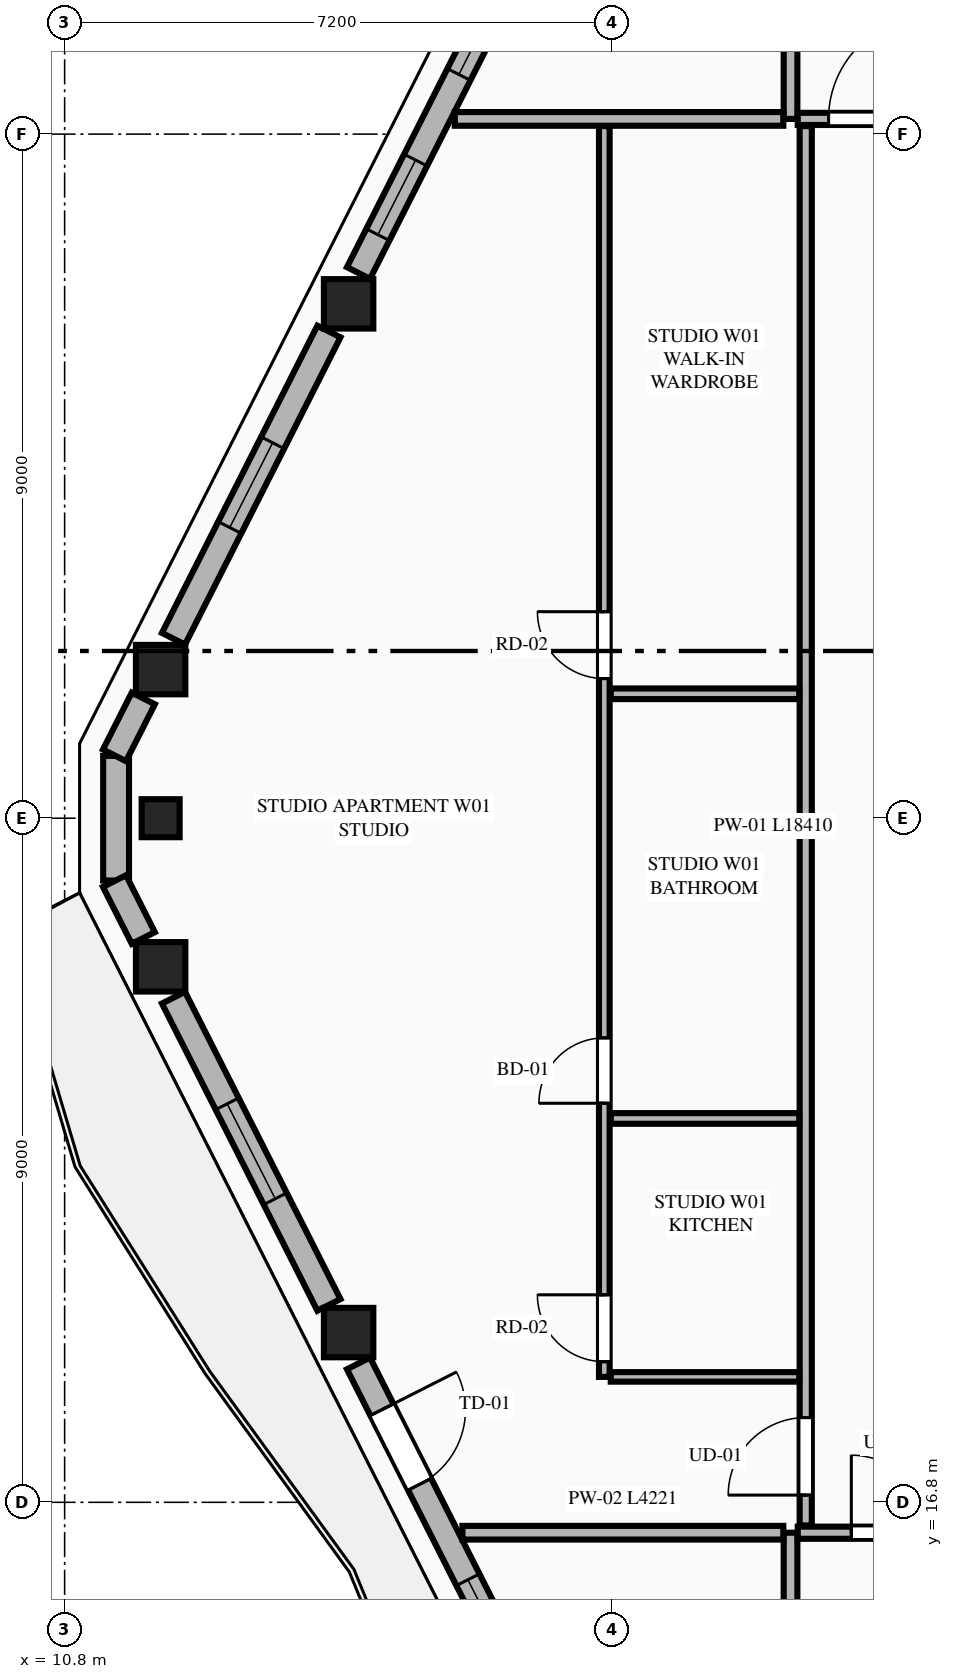
"""IFC4 building model, lengths in metres.
Left out: names, types, materials, properties, quantities, classifications, styles, units other than length and angle.
Written with IfcOpenShell. Run it as: python <this file> out.ifc"""

import sys

from ifc_helpers import new_model, si_unit, direction, frame, frame_2d, origin, origin_2d, place, context, subcontext, project, spatial, rectangle, extrude, element, fill, save


model = new_model("IFC4")
c1 = context("Model", 3, precision=1e-05, world=origin(), true_north=direction((0.0, 1.0)))
c2 = subcontext(c1, "Body", "Model", "MODEL_VIEW")
j1 = project(units=[si_unit("LENGTHUNIT", "METRE"), si_unit("PLANEANGLEUNIT", "RADIAN")], contexts=[c1])
p1 = place(None, origin())
s1 = spatial("IfcSite", under=j1, at=p1, CompositionType="ELEMENT")
p2 = place(p1, origin())
s2 = spatial("IfcBuilding", under=s1, at=p2, CompositionType="ELEMENT")
p3 = place(p2, frame((0.0, 0.0, 267.15)))
s3 = spatial("IfcBuildingStorey", under=s2, at=p3, CompositionType="ELEMENT", Elevation=267.15)
for number, where, z_axis, x_axis in (
    (1, (14.536, 32.567, 0.0), (0.0, 0.0, 1.0), (1.0, 0.0, 0.0)),
    (2, (12.063, 27.755, 0.0), (0.0, 0.0, 1.0), (1.0, 0.0, 0.0)),
    (3, (12.063, 23.845, 0.0), (0.0, 0.0, 1.0), (1.0, 0.0, 0.0)),
    (4, (14.536, 19.033, 0.0), (0.0, 0.0, 1.0), (1.0, 0.0, 0.0)),
):
    element("IfcColumn", number, at=place(p3, frame(where, z_axis=z_axis, x_axis=x_axis)), inside=s3, PredefinedType="COLUMN", context=c2, shape_type="SweptSolid", body=[
        extrude(rectangle(XDim=0.65, YDim=0.65, at=origin_2d()), origin(), (0.0, 0.0, 1.0), 3.65),
    ])
p4 = place(p3, frame((12.063, 25.8, 0.0), z_axis=(0.0, 0.0, 1.0), x_axis=(0.0, -1.0, 0.0)))
e5 = element("IfcColumn", 5, at=p4, inside=s3, PredefinedType="PILASTER", context=c2, shape_type="SweptSolid", body=[
    extrude(rectangle(XDim=0.5, YDim=0.35, at=origin_2d()), origin(), (0.0, 0.0, 1.0), 3.65),
])
p5 = place(p3, frame((11.477, 26.62, 0.0), z_axis=(0.0, 0.0, 1.0), x_axis=(0.0, -1.0, 0.0)))
e6 = element("IfcWall", 6, at=p5, inside=s3, PredefinedType="STANDARD", context=c2, shape_type="SweptSolid", body=[
    extrude(rectangle(XDim=1.64, YDim=0.34, at=frame_2d((0.82, 0.0))), origin(), (0.0, 0.0, 1.0), 3.45),
])
p6 = place(p3, frame((16.798, 37.187, 0.0), z_axis=(0.0, 0.0, 1.0), x_axis=(-0.451447516904, -0.892297674255, 0.0)))
e7 = element("IfcWall", 7, at=p6, inside=s3, PredefinedType="STANDARD", context=c2, shape_type="SweptSolid", body=[
    extrude(rectangle(XDim=4.723, YDim=0.34, at=frame_2d((2.361, 0.0))), origin(), (0.0, 0.0, 1.0), 2.983),
])
p7 = place(p6, frame((0.396, 0.0, 0.75)))
e8 = element("IfcOpeningElement", 8, at=p7, cuts=e7, PredefinedType="OPENING", context=c2, shape_type="SweptSolid", body=[
    extrude(rectangle(XDim=1.4, YDim=2.05, at=frame_2d((0.7, 1.025))), frame((0.0, 0.18, 0.0), z_axis=(0.0, -1.0, 0.0), x_axis=(1.0, 0.0, 0.0)), (0.0, 0.0, 1.0), 0.36),
])
p8 = place(p6, frame((3.058, 0.0, 0.75)))
e9 = element("IfcOpeningElement", 9, at=p8, cuts=e7, PredefinedType="OPENING", context=c2, shape_type="SweptSolid", body=[
    extrude(rectangle(XDim=1.1, YDim=2.0, at=frame_2d((0.55, 1.0))), frame((0.0, 0.18, 0.0), z_axis=(0.0, -1.0, 0.0), x_axis=(1.0, 0.0, 0.0)), (0.0, 0.0, 1.0), 0.36),
])
p9 = place(p3, frame((14.277, 32.203, 0.0), z_axis=(0.0, 0.0, 1.0), x_axis=(-0.45147697324, -0.892282770558, 0.0)))
e10 = element("IfcWall", 10, at=p9, inside=s3, PredefinedType="STANDARD", context=c2, shape_type="SweptSolid", body=[
    extrude(rectangle(XDim=4.53, YDim=0.34, at=frame_2d((2.265, 0.0))), origin(), (0.0, 0.0, 1.0), 2.983),
])
p10 = place(p9, frame((1.64, 0.0, 0.75)))
e11 = element("IfcOpeningElement", 11, at=p10, cuts=e10, PredefinedType="OPENING", context=c2, shape_type="SweptSolid", body=[
    extrude(rectangle(XDim=1.25, YDim=1.95, at=frame_2d((0.625, 0.975))), frame((0.0, 0.18, 0.0), z_axis=(0.0, -1.0, 0.0), x_axis=(1.0, 0.0, 0.0)), (0.0, 0.0, 1.0), 0.36),
])
p11 = place(p3, frame((11.835, 27.376, 0.0), z_axis=(0.0, 0.0, 1.0), x_axis=(-0.45139691133, -0.892323275748, 0.0)))
e12 = element("IfcWall", 12, at=p11, inside=s3, PredefinedType="STANDARD", context=c2, shape_type="SweptSolid", body=[
    extrude(rectangle(XDim=0.839, YDim=0.34, at=frame_2d((0.42, 0.0))), origin(), (0.0, 0.0, 1.0), 3.45),
])
p12 = place(p3, frame((11.456, 24.973, 0.0), z_axis=(0.0, 0.0, 1.0), x_axis=(0.4515140893, -0.892263989615, 0.0)))
e13 = element("IfcWall", 13, at=p12, inside=s3, PredefinedType="STANDARD", context=c2, shape_type="SweptSolid", body=[
    extrude(rectangle(XDim=0.839, YDim=0.34, at=frame_2d((0.419, 0.0))), origin(), (0.0, 0.0, 1.0), 3.45),
])
p13 = place(p3, frame((12.232, 23.439, 0.0), z_axis=(0.0, 0.0, 1.0), x_axis=(0.45147697324, -0.892282770558, 0.0)))
e14 = element("IfcWall", 14, at=p13, inside=s3, PredefinedType="STANDARD", context=c2, shape_type="SweptSolid", body=[
    extrude(rectangle(XDim=4.53, YDim=0.34, at=frame_2d((2.265, 0.0))), origin(), (0.0, 0.0, 1.0), 2.983),
])
p14 = place(p13, frame((1.565, 0.0, 0.75)))
e15 = element("IfcOpeningElement", 15, at=p14, cuts=e14, PredefinedType="OPENING", context=c2, shape_type="SweptSolid", body=[
    extrude(rectangle(XDim=1.4, YDim=2.05, at=frame_2d((0.7, 1.025))), frame((0.0, 0.18, 0.0), z_axis=(0.0, -1.0, 0.0), x_axis=(1.0, 0.0, 0.0)), (0.0, 0.0, 1.0), 0.36),
])
p15 = place(p3, frame((14.666, 18.627, 0.0), z_axis=(0.0, 0.0, 1.0), x_axis=(0.451468341582, -0.892287137949, 0.0)))
e16 = element("IfcWall", 16, at=p15, inside=s3, PredefinedType="STANDARD", context=c2, shape_type="SweptSolid", body=[
    extrude(rectangle(XDim=4.723, YDim=0.34, at=frame_2d((2.361, 0.0))), origin(), (0.0, 0.0, 1.0), 2.983),
])
p16 = place(p15, frame((0.682, 0.0, 0.0)))
e17 = element("IfcOpeningElement", 17, at=p16, cuts=e16, PredefinedType="OPENING", context=c2, shape_type="SweptSolid", body=[
    extrude(rectangle(XDim=1.1, YDim=2.25, at=frame_2d((0.55, 1.125))), frame((0.0, 0.18, 0.0), z_axis=(0.0, -1.0, 0.0), x_axis=(1.0, 0.0, 0.0)), (0.0, 0.0, 1.0), 0.36),
])
p17 = place(p15, frame((3.189, 0.0, 0.75)))
e18 = element("IfcOpeningElement", 18, at=p17, cuts=e16, PredefinedType="OPENING", context=c2, shape_type="SweptSolid", body=[
    extrude(rectangle(XDim=1.1, YDim=2.0, at=frame_2d((0.55, 1.0))), frame((0.0, 0.18, 0.0), z_axis=(0.0, -1.0, 0.0), x_axis=(1.0, 0.0, 0.0)), (0.0, 0.0, 1.0), 0.36),
])
p18 = place(p3, frame((20.35, 8.119, 0.0), z_axis=(0.0, 0.0, 1.0), x_axis=(0.0, 1.0, 0.0)))
e19 = element("IfcWall", 19, at=p18, inside=s3, PredefinedType="PARTITIONING", context=c2, shape_type="SweptSolid", body=[
    extrude(rectangle(XDim=8.281, YDim=0.18, at=frame_2d((4.141, 0.0))), origin(), (0.0, 0.0, 1.0), 3.45),
])
p19 = place(p3, frame((20.445, 16.4, 0.0), z_axis=(0.0, 0.0, 1.0), x_axis=(1.0, 0.0, 0.0)))
e20 = element("IfcWall", 20, at=p19, inside=s3, PredefinedType="PARTITIONING", context=c2, shape_type="SweptSolid", body=[
    extrude(rectangle(XDim=23.91, YDim=0.16, at=frame_2d((11.955, 0.0))), origin(), (0.0, 0.0, 1.0), 3.45),
])
p20 = place(p19, frame((0.705, 0.0, 0.0)))
e21 = element("IfcOpeningElement", 21, at=p20, cuts=e20, PredefinedType="OPENING", context=c2, shape_type="SweptSolid", body=[
    extrude(rectangle(XDim=1.02, YDim=2.25, at=frame_2d((0.51, 1.125))), frame((0.0, 0.09, 0.0), z_axis=(0.0, -1.0, 0.0), x_axis=(1.0, 0.0, 0.0)), (0.0, 0.0, 1.0), 0.18),
])
p21 = place(p3, frame((20.35, 35.0, 0.0), z_axis=(0.0, 0.0, 1.0), x_axis=(0.0, 1.0, 0.0)))
e22 = element("IfcWall", 22, at=p21, inside=s3, PredefinedType="PARTITIONING", context=c2, shape_type="SweptSolid", body=[
    extrude(rectangle(XDim=8.481, YDim=0.18, at=frame_2d((4.24, 0.0))), origin(), (0.0, 0.0, 1.0), 3.45),
])
p22 = place(p3, frame((20.445, 35.0, 0.0), z_axis=(0.0, 0.0, 1.0), x_axis=(1.0, 0.0, 0.0)))
e23 = element("IfcWall", 23, at=p22, inside=s3, PredefinedType="PARTITIONING", context=c2, shape_type="SweptSolid", body=[
    extrude(rectangle(XDim=23.91, YDim=0.16, at=frame_2d((11.955, 0.0))), origin(), (0.0, 0.0, 1.0), 3.45),
])
p23 = place(p22, frame((0.405, 0.0, 0.0)))
e24 = element("IfcOpeningElement", 24, at=p23, cuts=e23, PredefinedType="OPENING", context=c2, shape_type="SweptSolid", body=[
    extrude(rectangle(XDim=1.35, YDim=2.35, at=frame_2d((0.675, 1.175))), frame((0.0, 0.09, 0.0), z_axis=(0.0, -1.0, 0.0), x_axis=(1.0, 0.0, 0.0)), (0.0, 0.0, 1.0), 0.18),
])
p24 = place(p3, frame((16.034, 16.4, 0.0), z_axis=(0.0, 0.0, 1.0), x_axis=(1.0, 0.0, 0.0)))
e25 = element("IfcWall", 25, at=p24, inside=s3, PredefinedType="PARTITIONING", context=c2, shape_type="SweptSolid", body=[
    extrude(rectangle(XDim=4.221, YDim=0.18, at=frame_2d((2.11, 0.0))), origin(), (0.0, 0.0, 1.0), 3.45),
])
p25 = place(p3, frame((15.933, 35.0, 0.0), z_axis=(0.0, 0.0, 1.0), x_axis=(1.0, 0.0, 0.0)))
e26 = element("IfcWall", 26, at=p25, inside=s3, PredefinedType="PARTITIONING", context=c2, shape_type="SweptSolid", body=[
    extrude(rectangle(XDim=4.322, YDim=0.18, at=frame_2d((2.161, 0.0))), origin(), (0.0, 0.0, 1.0), 3.45),
])
p26 = place(p3, frame((20.55, 16.495, 0.0), z_axis=(0.0, 0.0, 1.0), x_axis=(0.0, 1.0, 0.0)))
e27 = element("IfcWall", 27, at=p26, inside=s3, PredefinedType="PARTITIONING", context=c2, shape_type="SweptSolid", body=[
    extrude(rectangle(XDim=18.41, YDim=0.16, at=frame_2d((9.205, 0.0))), origin(), (0.0, 0.0, 1.0), 3.137),
])
p27 = place(p26, frame((0.4, 0.0, 0.0)))
e28 = element("IfcOpeningElement", 28, at=p27, cuts=e27, PredefinedType="OPENING", context=c2, shape_type="SweptSolid", body=[
    extrude(rectangle(XDim=1.02, YDim=2.25, at=frame_2d((0.51, 1.125))), frame((0.0, 0.09, 0.0), z_axis=(0.0, -1.0, 0.0), x_axis=(1.0, 0.0, 0.0)), (0.0, 0.0, 1.0), 0.18),
])
p28 = place(p3, frame((17.985, 18.45, 0.0), z_axis=(0.0, 0.0, 1.0), x_axis=(1.0, 0.0, 0.0)))
e29 = element("IfcWall", 29, at=p28, inside=s3, PredefinedType="PARTITIONING", context=c2, shape_type="SweptSolid", body=[
    extrude(rectangle(XDim=2.48, YDim=0.125, at=frame_2d((1.24, 0.0))), origin(), (0.0, 0.0, 1.0), 3.45),
])
p29 = place(p3, frame((17.9, 18.45, 0.0), z_axis=(0.0, 0.0, 1.0), x_axis=(0.0, 1.0, 0.0)))
e30 = element("IfcWall", 30, at=p29, inside=s3, PredefinedType="PLUMBINGWALL", context=c2, shape_type="SweptSolid", body=[
    extrude(rectangle(XDim=16.455, YDim=0.14, at=frame_2d((8.228, 0.0))), origin(), (0.0, 0.0, 1.0), 3.45),
])
p30 = place(p29, frame((3.6, 0.0, 0.0)))
e31 = element("IfcOpeningElement", 31, at=p30, cuts=e30, PredefinedType="OPENING", context=c2, shape_type="SweptSolid", body=[
    extrude(rectangle(XDim=0.86, YDim=2.1, at=frame_2d((0.43, 1.05))), frame((0.0, 0.08, 0.0), z_axis=(0.0, -1.0, 0.0), x_axis=(1.0, 0.0, 0.0)), (0.0, 0.0, 1.0), 0.16),
])
p31 = place(p29, frame((9.187, 0.0, 0.0)))
e32 = element("IfcOpeningElement", 32, at=p31, cuts=e30, PredefinedType="OPENING", context=c2, shape_type="SweptSolid", body=[
    extrude(rectangle(XDim=0.88, YDim=2.15, at=frame_2d((0.44, 1.075))), frame((0.0, 0.08, 0.0), z_axis=(0.0, -1.0, 0.0), x_axis=(1.0, 0.0, 0.0)), (0.0, 0.0, 1.0), 0.16),
])
p32 = place(p29, frame((0.2, 0.0, 0.0)))
e33 = element("IfcOpeningElement", 33, at=p32, cuts=e30, PredefinedType="OPENING", context=c2, shape_type="SweptSolid", body=[
    extrude(rectangle(XDim=0.88, YDim=2.15, at=frame_2d((0.44, 1.075))), frame((0.0, 0.08, 0.0), z_axis=(0.0, -1.0, 0.0), x_axis=(1.0, 0.0, 0.0)), (0.0, 0.0, 1.0), 0.16),
])
for number, where, z_axis, x_axis in (
    (34, (17.985, 21.85, 0.0), (0.0, 0.0, 1.0), (1.0, 0.0, 0.0)),
    (35, (17.985, 27.437, 0.0), (0.0, 0.0, 1.0), (1.0, 0.0, 0.0)),
):
    element("IfcWall", number, at=place(p3, frame(where, z_axis=z_axis, x_axis=x_axis)), inside=s3, PredefinedType="PLUMBINGWALL", context=c2, shape_type="SweptSolid", body=[
        extrude(rectangle(XDim=2.48, YDim=0.14, at=frame_2d((1.24, 0.0))), origin(), (0.0, 0.0, 1.0), 3.45),
    ])
p33 = place(p7, origin())
e36 = element("IfcWindow", 36, at=p33, inside=s3, PartitioningType="SINGLE_PANEL", PredefinedType="WINDOW", context=c2, shape_type="SweptSolid", body=[
    extrude(rectangle(XDim=1.4, YDim=2.05, at=frame_2d((0.7, 1.025))), frame((0.0, 0.03, 0.0), z_axis=(0.0, -1.0, 0.0), x_axis=(1.0, 0.0, 0.0)), (0.0, 0.0, 1.0), 0.06),
])
fill(e8, e36)
p34 = place(p10, origin())
e37 = element("IfcWindow", 37, at=p34, inside=s3, PartitioningType="SINGLE_PANEL", PredefinedType="WINDOW", context=c2, shape_type="SweptSolid", body=[
    extrude(rectangle(XDim=1.25, YDim=1.95, at=frame_2d((0.625, 0.975))), frame((0.0, 0.03, 0.0), z_axis=(0.0, -1.0, 0.0), x_axis=(1.0, 0.0, 0.0)), (0.0, 0.0, 1.0), 0.06),
])
fill(e11, e37)
p35 = place(p14, origin())
e38 = element("IfcWindow", 38, at=p35, inside=s3, PartitioningType="SINGLE_PANEL", PredefinedType="WINDOW", context=c2, shape_type="SweptSolid", body=[
    extrude(rectangle(XDim=1.4, YDim=2.05, at=frame_2d((0.7, 1.025))), frame((0.0, 0.03, 0.0), z_axis=(0.0, -1.0, 0.0), x_axis=(1.0, 0.0, 0.0)), (0.0, 0.0, 1.0), 0.06),
])
fill(e15, e38)
p36 = place(p16, origin())
e39 = element("IfcDoor", 39, at=p36, inside=s3, OperationType="SINGLE_SWING_LEFT", PredefinedType="DOOR", context=c2, shape_type="SweptSolid", body=[
    extrude(rectangle(XDim=1.1, YDim=2.25, at=frame_2d((0.55, 1.125))), frame((0.0, 0.025, 0.0), z_axis=(0.0, -1.0, 0.0), x_axis=(1.0, 0.0, 0.0)), (0.0, 0.0, 1.0), 0.05),
])
fill(e17, e39)
p37 = place(p20, origin())
e40 = element("IfcDoor", 40, at=p37, inside=s3, OperationType="SINGLE_SWING_LEFT", PredefinedType="DOOR", context=c2, shape_type="SweptSolid", body=[
    extrude(rectangle(XDim=1.02, YDim=2.25, at=frame_2d((0.51, 1.125))), frame((0.0, 0.025, 0.0), z_axis=(0.0, -1.0, 0.0), x_axis=(1.0, 0.0, 0.0)), (0.0, 0.0, 1.0), 0.05),
])
fill(e21, e40)
p38 = place(p23, origin())
e41 = element("IfcDoor", 41, at=p38, inside=s3, OperationType="SINGLE_SWING_RIGHT", PredefinedType="DOOR", context=c2, shape_type="SweptSolid", body=[
    extrude(rectangle(XDim=1.35, YDim=2.35, at=frame_2d((0.675, 1.175))), frame((0.0, 0.025, 0.0), z_axis=(0.0, -1.0, 0.0), x_axis=(1.0, 0.0, 0.0)), (0.0, 0.0, 1.0), 0.05),
])
fill(e24, e41)
p39 = place(p30, origin())
e42 = element("IfcDoor", 42, at=p39, inside=s3, OperationType="SINGLE_SWING_LEFT", PredefinedType="DOOR", context=c2, shape_type="SweptSolid", body=[
    extrude(rectangle(XDim=0.86, YDim=2.1, at=frame_2d((0.43, 1.05))), frame((0.0, 0.025, 0.0), z_axis=(0.0, -1.0, 0.0), x_axis=(1.0, 0.0, 0.0)), (0.0, 0.0, 1.0), 0.05),
])
fill(e31, e42)
p40 = place(p31, origin())
e43 = element("IfcDoor", 43, at=p40, inside=s3, OperationType="SINGLE_SWING_RIGHT", PredefinedType="DOOR", context=c2, shape_type="SweptSolid", body=[
    extrude(rectangle(XDim=0.88, YDim=2.15, at=frame_2d((0.44, 1.075))), frame((0.0, 0.025, 0.0), z_axis=(0.0, -1.0, 0.0), x_axis=(1.0, 0.0, 0.0)), (0.0, 0.0, 1.0), 0.05),
])
fill(e32, e43)
p41 = place(p27, origin())
e44 = element("IfcDoor", 44, at=p41, inside=s3, OperationType="SINGLE_SWING_LEFT", PredefinedType="DOOR", context=c2, shape_type="SweptSolid", body=[
    extrude(rectangle(XDim=1.02, YDim=2.25, at=frame_2d((0.51, 1.125))), frame((0.0, 0.025, 0.0), z_axis=(0.0, -1.0, 0.0), x_axis=(1.0, 0.0, 0.0)), (0.0, 0.0, 1.0), 0.05),
])
fill(e28, e44)
p42 = place(p32, origin())
e45 = element("IfcDoor", 45, at=p42, inside=s3, OperationType="SINGLE_SWING_RIGHT", PredefinedType="DOOR", context=c2, shape_type="SweptSolid", body=[
    extrude(rectangle(XDim=0.88, YDim=2.15, at=frame_2d((0.44, 1.075))), frame((0.0, 0.025, 0.0), z_axis=(0.0, -1.0, 0.0), x_axis=(1.0, 0.0, 0.0)), (0.0, 0.0, 1.0), 0.05),
])
fill(e33, e45)
p43 = place(p8, origin())
e46 = element("IfcWindow", 46, at=p43, inside=s3, PartitioningType="SINGLE_PANEL", PredefinedType="WINDOW", context=c2, shape_type="SweptSolid", body=[
    extrude(rectangle(XDim=1.1, YDim=2.0, at=frame_2d((0.55, 1.0))), frame((0.0, 0.03, 0.0), z_axis=(0.0, -1.0, 0.0), x_axis=(1.0, 0.0, 0.0)), (0.0, 0.0, 1.0), 0.06),
])
fill(e9, e46)
p44 = place(p17, origin())
e47 = element("IfcWindow", 47, at=p44, inside=s3, PartitioningType="SINGLE_PANEL", PredefinedType="WINDOW", context=c2, shape_type="SweptSolid", body=[
    extrude(rectangle(XDim=1.1, YDim=2.0, at=frame_2d((0.55, 1.0))), frame((0.0, 0.03, 0.0), z_axis=(0.0, -1.0, 0.0), x_axis=(1.0, 0.0, 0.0)), (0.0, 0.0, 1.0), 0.06),
])
fill(e18, e47)
save(model, sys.argv[1])
